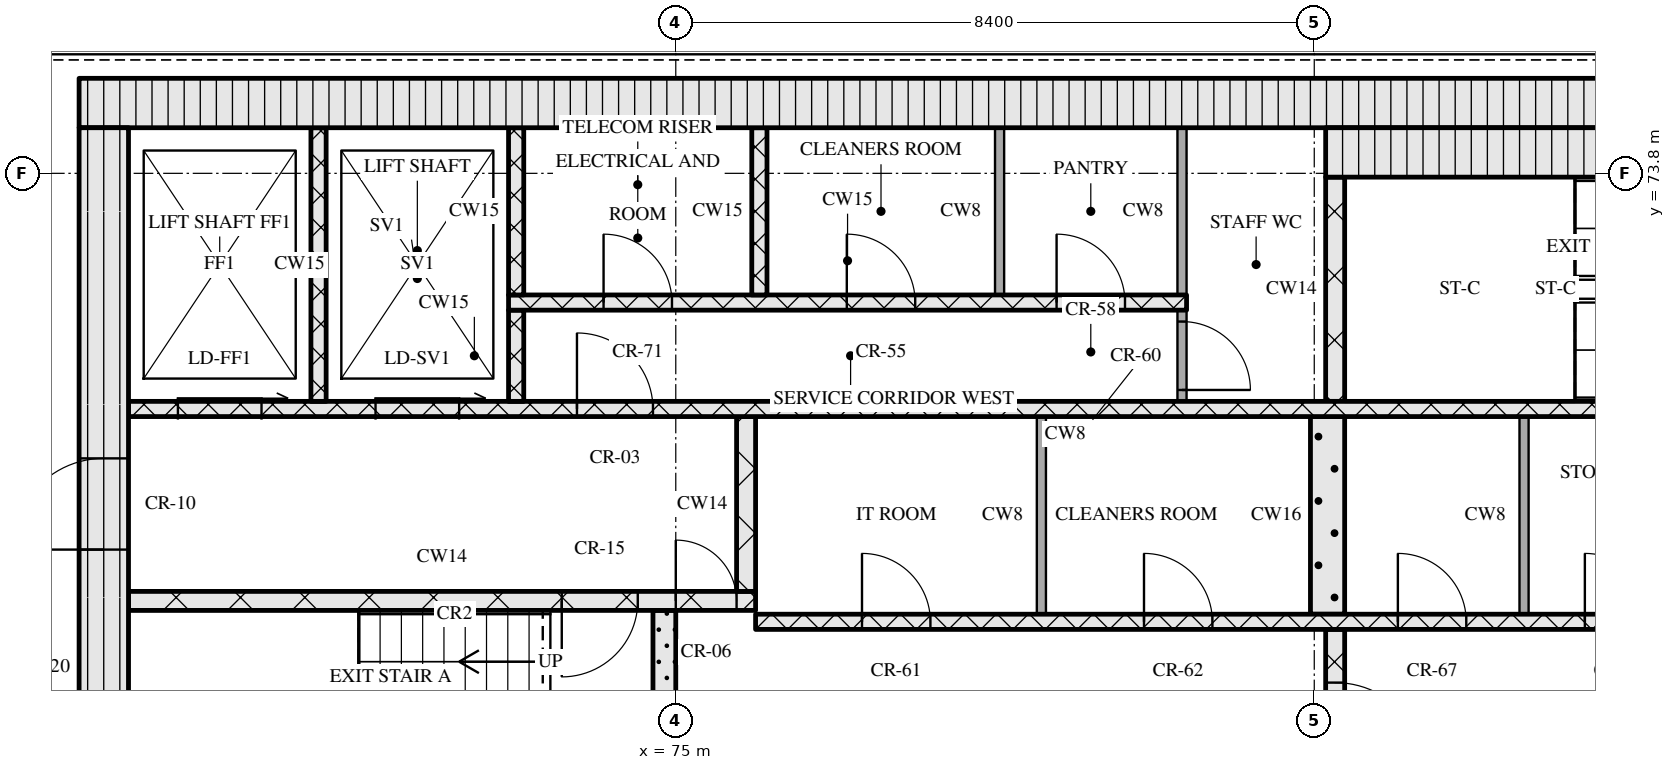
"""IFC4 building model, lengths in metres.
Left out: names, types, materials, properties, quantities, classifications, styles, units other than length and angle.
Written with IfcOpenShell. Run it as: python <this file> out.ifc"""

import sys

from ifc_helpers import new_model, si_unit, direction, frame, frame_2d, origin, place, context, subcontext, project, spatial, rectangle, extrude, element, fill, save


model = new_model("IFC4")
c1 = context("Model", 3, precision=1e-05, world=origin(), true_north=direction((0.0, 1.0)))
c2 = subcontext(c1, "Body", "Model", "MODEL_VIEW")
j1 = project(units=[si_unit("LENGTHUNIT", "METRE"), si_unit("PLANEANGLEUNIT", "RADIAN")], contexts=[c1])
p1 = place(None, origin())
s1 = spatial("IfcSite", under=j1, at=p1, CompositionType="ELEMENT")
p2 = place(p1, origin())
s2 = spatial("IfcBuilding", under=s1, at=p2, CompositionType="ELEMENT")
p3 = place(p2, frame((0.0, 0.0, 205.5)))
s3 = spatial("IfcBuildingStorey", under=s2, at=p3, CompositionType="ELEMENT", Elevation=205.5)
p4 = place(p3, frame((67.15, 74.725, 0.0), z_axis=(0.0, 0.0, 1.0), x_axis=(1.0, 0.0, 0.0)))
e1 = element("IfcWall", 1, at=p4, inside=s3, PredefinedType="SOLIDWALL", context=c2, shape_type="SweptSolid", body=[
    extrude(rectangle(XDim=40.9, YDim=0.65, at=frame_2d((20.45, 0.0))), origin(), (0.0, 0.0, 1.0), 3.32),
])
p5 = place(p3, frame((67.475, 62.4, 0.0), z_axis=(0.0, 0.0, 1.0), x_axis=(0.0, 1.0, 0.0)))
e2 = element("IfcWall", 2, at=p5, inside=s3, PredefinedType="SOLIDWALL", context=c2, shape_type="SweptSolid", body=[
    extrude(rectangle(XDim=12.0, YDim=0.65, at=frame_2d((6.0, 0.0))), origin(), (0.0, 0.0, 1.0), 3.32),
])
p6 = place(p5, frame((6.45, 0.0, 0.0)))
e3 = element("IfcOpeningElement", 3, at=p6, cuts=e2, PredefinedType="OPENING", context=c2, shape_type="SweptSolid", body=[
    extrude(rectangle(XDim=1.2, YDim=2.1, at=frame_2d((0.6, 1.05))), frame((0.0, 0.335, 0.0), z_axis=(0.0, -1.0, 0.0), x_axis=(1.0, 0.0, 0.0)), (0.0, 0.0, 1.0), 0.67),
])
p7 = place(p3, frame((74.85, 65.2, 0.0), z_axis=(0.0, 0.0, 1.0), x_axis=(0.0, 1.0, 0.0)))
e4 = element("IfcWall", 4, at=p7, inside=s3, PredefinedType="SOLIDWALL", context=c2, shape_type="SweptSolid", body=[
    extrude(rectangle(XDim=2.85, YDim=0.3, at=frame_2d((1.425, 0.0))), origin(), (0.0, 0.0, 1.0), 3.32),
])
p8 = place(p3, frame((83.675, 65.2, 0.0), z_axis=(0.0, 0.0, 1.0), x_axis=(0.0, 1.0, 0.0)))
e5 = element("IfcWall", 5, at=p8, inside=s3, PredefinedType="SOLIDWALL", context=c2, shape_type="SweptSolid", body=[
    extrude(rectangle(XDim=2.6, YDim=0.25, at=frame_2d((1.3, 0.0))), origin(), (0.0, 0.0, 1.0), 3.32),
])
p9 = place(p8, frame((0.7, 0.0, 0.0)))
e6 = element("IfcOpeningElement", 6, at=p9, cuts=e5, PredefinedType="OPENING", context=c2, shape_type="SweptSolid", body=[
    extrude(rectangle(XDim=1.2, YDim=2.1, at=frame_2d((0.6, 1.05))), frame((0.0, 0.135, 0.0), z_axis=(0.0, -1.0, 0.0), x_axis=(1.0, 0.0, 0.0)), (0.0, 0.0, 1.0), 0.27),
])
p10 = place(p3, frame((76.05, 67.9, 0.0), z_axis=(0.0, 0.0, 1.0), x_axis=(1.0, 0.0, 0.0)))
e7 = element("IfcWall", 7, at=p10, inside=s3, PredefinedType="SOLIDWALL", context=c2, shape_type="SweptSolid", body=[
    extrude(rectangle(XDim=23.1, YDim=0.2, at=frame_2d((11.55, 0.0))), origin(), (0.0, 0.0, 1.0), 3.32),
])
p11 = place(p10, frame((1.4, 0.0, 0.0)))
e8 = element("IfcOpeningElement", 8, at=p11, cuts=e7, PredefinedType="OPENING", context=c2, shape_type="SweptSolid", body=[
    extrude(rectangle(XDim=0.9, YDim=2.1, at=frame_2d((0.45, 1.05))), frame((0.0, 0.11, 0.0), z_axis=(0.0, -1.0, 0.0), x_axis=(1.0, 0.0, 0.0)), (0.0, 0.0, 1.0), 0.22),
])
p12 = place(p10, frame((5.11, 0.0, 0.0)))
e9 = element("IfcOpeningElement", 9, at=p12, cuts=e7, PredefinedType="OPENING", context=c2, shape_type="SweptSolid", body=[
    extrude(rectangle(XDim=0.9, YDim=2.1, at=frame_2d((0.45, 1.05))), frame((0.0, 0.11, 0.0), z_axis=(0.0, -1.0, 0.0), x_axis=(1.0, 0.0, 0.0)), (0.0, 0.0, 1.0), 0.22),
])
p13 = place(p10, frame((8.45, 0.0, 0.0)))
e10 = element("IfcOpeningElement", 10, at=p13, cuts=e7, PredefinedType="OPENING", context=c2, shape_type="SweptSolid", body=[
    extrude(rectangle(XDim=0.9, YDim=2.1, at=frame_2d((0.45, 1.05))), frame((0.0, 0.11, 0.0), z_axis=(0.0, -1.0, 0.0), x_axis=(1.0, 0.0, 0.0)), (0.0, 0.0, 1.0), 0.22),
])
p14 = place(p10, frame((10.91, 0.0, 0.0)))
e11 = element("IfcOpeningElement", 11, at=p14, cuts=e7, PredefinedType="OPENING", context=c2, shape_type="SweptSolid", body=[
    extrude(rectangle(XDim=0.9, YDim=2.1, at=frame_2d((0.45, 1.05))), frame((0.0, 0.11, 0.0), z_axis=(0.0, -1.0, 0.0), x_axis=(1.0, 0.0, 0.0)), (0.0, 0.0, 1.0), 0.22),
])
p15 = place(p10, frame((13.55, 0.0, 0.0)))
e12 = element("IfcOpeningElement", 12, at=p15, cuts=e7, PredefinedType="OPENING", context=c2, shape_type="SweptSolid", body=[
    extrude(rectangle(XDim=1.0, YDim=2.1, at=frame_2d((0.5, 1.05))), frame((0.0, 0.11, 0.0), z_axis=(0.0, -1.0, 0.0), x_axis=(1.0, 0.0, 0.0)), (0.0, 0.0, 1.0), 0.22),
])
p16 = place(p10, frame((16.2, 0.0, 0.0)))
e13 = element("IfcOpeningElement", 13, at=p16, cuts=e7, PredefinedType="OPENING", context=c2, shape_type="SweptSolid", body=[
    extrude(rectangle(XDim=1.1, YDim=2.1, at=frame_2d((0.55, 1.05))), frame((0.0, 0.11, 0.0), z_axis=(0.0, -1.0, 0.0), x_axis=(1.0, 0.0, 0.0)), (0.0, 0.0, 1.0), 0.22),
])
p17 = place(p10, frame((18.7, 0.0, 0.0)))
e14 = element("IfcOpeningElement", 14, at=p17, cuts=e7, PredefinedType="OPENING", context=c2, shape_type="SweptSolid", body=[
    extrude(rectangle(XDim=1.1, YDim=2.1, at=frame_2d((0.55, 1.05))), frame((0.0, 0.11, 0.0), z_axis=(0.0, -1.0, 0.0), x_axis=(1.0, 0.0, 0.0)), (0.0, 0.0, 1.0), 0.22),
])
p18 = place(p10, frame((21.2, 0.0, 0.0)))
e15 = element("IfcOpeningElement", 15, at=p18, cuts=e7, PredefinedType="OPENING", context=c2, shape_type="SweptSolid", body=[
    extrude(rectangle(XDim=1.1, YDim=2.1, at=frame_2d((0.55, 1.05))), frame((0.0, 0.11, 0.0), z_axis=(0.0, -1.0, 0.0), x_axis=(1.0, 0.0, 0.0)), (0.0, 0.0, 1.0), 0.22),
])
p19 = place(p3, frame((79.81, 68.0, 0.0), z_axis=(0.0, 0.0, 1.0), x_axis=(0.0, 1.0, 0.0)))
e16 = element("IfcWall", 16, at=p19, inside=s3, PredefinedType="PARTITIONING", context=c2, shape_type="SweptSolid", body=[
    extrude(rectangle(XDim=2.6, YDim=0.12, at=frame_2d((1.3, 0.0))), origin(), (0.0, 0.0, 1.0), 3.32),
])
p20 = place(p3, frame((83.575, 68.0, 0.0), z_axis=(0.0, 0.0, 1.0), x_axis=(0.0, 1.0, 0.0)))
e17 = element("IfcWall", 17, at=p20, inside=s3, PredefinedType="SOLIDWALL", context=c2, shape_type="SweptSolid", body=[
    extrude(rectangle(XDim=2.6, YDim=0.45, at=frame_2d((1.3, 0.0))), origin(), (0.0, 0.0, 1.0), 3.32),
])
p21 = place(p3, frame((86.16, 68.0, 0.0), z_axis=(0.0, 0.0, 1.0), x_axis=(0.0, 1.0, 0.0)))
e18 = element("IfcWall", 18, at=p21, inside=s3, PredefinedType="PARTITIONING", context=c2, shape_type="SweptSolid", body=[
    extrude(rectangle(XDim=2.6, YDim=0.12, at=frame_2d((1.3, 0.0))), origin(), (0.0, 0.0, 1.0), 3.32),
])
p22 = place(p3, frame((67.8, 68.175, 0.0), z_axis=(0.0, 0.0, 1.0), x_axis=(1.0, 0.0, 0.0)))
e19 = element("IfcWall", 19, at=p22, inside=s3, PredefinedType="SOLIDWALL", context=c2, shape_type="SweptSolid", body=[
    extrude(rectangle(XDim=8.25, YDim=0.25, at=frame_2d((4.125, 0.0))), origin(), (0.0, 0.0, 1.0), 3.32),
])
p23 = place(p22, frame((5.7, 0.0, 0.0)))
e20 = element("IfcOpeningElement", 20, at=p23, cuts=e19, PredefinedType="OPENING", context=c2, shape_type="SweptSolid", body=[
    extrude(rectangle(XDim=1.0, YDim=2.1, at=frame_2d((0.5, 1.05))), frame((0.0, 0.135, 0.0), z_axis=(0.0, -1.0, 0.0), x_axis=(1.0, 0.0, 0.0)), (0.0, 0.0, 1.0), 0.27),
])
p24 = place(p22, frame((7.2, 0.0, 0.0)))
e21 = element("IfcOpeningElement", 21, at=p24, cuts=e19, PredefinedType="OPENING", context=c2, shape_type="SweptSolid", body=[
    extrude(rectangle(XDim=0.8, YDim=2.1, at=frame_2d((0.4, 1.05))), frame((0.0, 0.135, 0.0), z_axis=(0.0, -1.0, 0.0), x_axis=(1.0, 0.0, 0.0)), (0.0, 0.0, 1.0), 0.27),
])
p25 = place(p3, frame((75.925, 68.3, 0.0), z_axis=(0.0, 0.0, 1.0), x_axis=(0.0, 1.0, 0.0)))
e22 = element("IfcWall", 22, at=p25, inside=s3, PredefinedType="SOLIDWALL", context=c2, shape_type="SweptSolid", body=[
    extrude(rectangle(XDim=2.3, YDim=0.25, at=frame_2d((1.15, 0.0))), origin(), (0.0, 0.0, 1.0), 3.32),
])
p26 = place(p3, frame((67.8, 70.7, 0.0), z_axis=(0.0, 0.0, 1.0), x_axis=(1.0, 0.0, 0.0)))
e23 = element("IfcWall", 23, at=p26, inside=s3, PredefinedType="SOLIDWALL", context=c2, shape_type="SweptSolid", body=[
    extrude(rectangle(XDim=39.6, YDim=0.2, at=frame_2d((19.8, 0.0))), origin(), (0.0, 0.0, 1.0), 3.32),
])
p27 = place(p26, frame((0.65, 0.0, 0.0)))
e24 = element("IfcOpeningElement", 24, at=p27, cuts=e23, PredefinedType="OPENING", context=c2, shape_type="SweptSolid", body=[
    extrude(rectangle(XDim=1.1, YDim=2.1, at=frame_2d((0.55, 1.05))), frame((0.0, 0.11, 0.0), z_axis=(0.0, -1.0, 0.0), x_axis=(1.0, 0.0, 0.0)), (0.0, 0.0, 1.0), 0.22),
])
p28 = place(p26, frame((3.25, 0.0, 0.0)))
e25 = element("IfcOpeningElement", 25, at=p28, cuts=e23, PredefinedType="OPENING", context=c2, shape_type="SweptSolid", body=[
    extrude(rectangle(XDim=1.1, YDim=2.1, at=frame_2d((0.55, 1.05))), frame((0.0, 0.11, 0.0), z_axis=(0.0, -1.0, 0.0), x_axis=(1.0, 0.0, 0.0)), (0.0, 0.0, 1.0), 0.22),
])
p29 = place(p26, frame((5.9, 0.0, 0.0)))
e26 = element("IfcOpeningElement", 26, at=p29, cuts=e23, PredefinedType="OPENING", context=c2, shape_type="SweptSolid", body=[
    extrude(rectangle(XDim=1.0, YDim=2.1, at=frame_2d((0.5, 1.05))), frame((0.0, 0.11, 0.0), z_axis=(0.0, -1.0, 0.0), x_axis=(1.0, 0.0, 0.0)), (0.0, 0.0, 1.0), 0.22),
])
p30 = place(p26, frame((21.7, 0.0, 0.0)))
e27 = element("IfcOpeningElement", 27, at=p30, cuts=e23, PredefinedType="OPENING", context=c2, shape_type="SweptSolid", body=[
    extrude(rectangle(XDim=1.0, YDim=2.1, at=frame_2d((0.5, 1.05))), frame((0.0, 0.11, 0.0), z_axis=(0.0, -1.0, 0.0), x_axis=(1.0, 0.0, 0.0)), (0.0, 0.0, 1.0), 0.22),
])
p31 = place(p26, frame((32.7, 0.0, 0.0)))
e28 = element("IfcOpeningElement", 28, at=p31, cuts=e23, PredefinedType="OPENING", context=c2, shape_type="SweptSolid", body=[
    extrude(rectangle(XDim=1.0, YDim=2.1, at=frame_2d((0.5, 1.05))), frame((0.0, 0.11, 0.0), z_axis=(0.0, -1.0, 0.0), x_axis=(1.0, 0.0, 0.0)), (0.0, 0.0, 1.0), 0.22),
])
p32 = place(p26, frame((35.25, 0.0, 0.0)))
e29 = element("IfcOpeningElement", 29, at=p32, cuts=e23, PredefinedType="OPENING", context=c2, shape_type="SweptSolid", body=[
    extrude(rectangle(XDim=1.1, YDim=2.1, at=frame_2d((0.55, 1.05))), frame((0.0, 0.11, 0.0), z_axis=(0.0, -1.0, 0.0), x_axis=(1.0, 0.0, 0.0)), (0.0, 0.0, 1.0), 0.22),
])
p33 = place(p26, frame((37.85, 0.0, 0.0)))
e30 = element("IfcOpeningElement", 30, at=p33, cuts=e23, PredefinedType="OPENING", context=c2, shape_type="SweptSolid", body=[
    extrude(rectangle(XDim=1.1, YDim=2.1, at=frame_2d((0.55, 1.05))), frame((0.0, 0.11, 0.0), z_axis=(0.0, -1.0, 0.0), x_axis=(1.0, 0.0, 0.0)), (0.0, 0.0, 1.0), 0.22),
])
p34 = place(p3, frame((70.3, 70.8, 0.0), z_axis=(0.0, 0.0, 1.0), x_axis=(0.0, 1.0, 0.0)))
e31 = element("IfcWall", 31, at=p34, inside=s3, PredefinedType="SOLIDWALL", context=c2, shape_type="SweptSolid", body=[
    extrude(rectangle(XDim=3.6, YDim=0.2, at=frame_2d((1.8, 0.0))), origin(), (0.0, 0.0, 1.0), 3.32),
])
p35 = place(p3, frame((72.9, 70.8, 0.0), z_axis=(0.0, 0.0, 1.0), x_axis=(0.0, 1.0, 0.0)))
e32 = element("IfcWall", 32, at=p35, inside=s3, PredefinedType="SOLIDWALL", context=c2, shape_type="SweptSolid", body=[
    extrude(rectangle(XDim=1.2, YDim=0.2, at=frame_2d((0.6, 0.0))), origin(), (0.0, 0.0, 1.0), 3.32),
])
p36 = place(p3, frame((81.66, 70.8, 0.0), z_axis=(0.0, 0.0, 1.0), x_axis=(0.0, 1.0, 0.0)))
e33 = element("IfcWall", 33, at=p36, inside=s3, PredefinedType="PARTITIONING", context=c2, shape_type="SweptSolid", body=[
    extrude(rectangle(XDim=1.2, YDim=0.12, at=frame_2d((0.6, 0.0))), origin(), (0.0, 0.0, 1.0), 3.32),
])
p37 = place(p36, frame((0.15, 0.0, 0.0)))
e34 = element("IfcOpeningElement", 34, at=p37, cuts=e33, PredefinedType="OPENING", context=c2, shape_type="SweptSolid", body=[
    extrude(rectangle(XDim=0.9, YDim=2.1, at=frame_2d((0.45, 1.05))), frame((0.0, 0.07, 0.0), z_axis=(0.0, -1.0, 0.0), x_axis=(1.0, 0.0, 0.0)), (0.0, 0.0, 1.0), 0.14),
])
p38 = place(p3, frame((83.675, 70.8, 0.0), z_axis=(0.0, 0.0, 1.0), x_axis=(0.0, 1.0, 0.0)))
e35 = element("IfcWall", 35, at=p38, inside=s3, PredefinedType="SOLIDWALL", context=c2, shape_type="SweptSolid", body=[
    extrude(rectangle(XDim=2.95, YDim=0.25, at=frame_2d((1.475, 0.0))), origin(), (0.0, 0.0, 1.0), 3.32),
])
p39 = place(p3, frame((72.8, 72.1, 0.0), z_axis=(0.0, 0.0, 1.0), x_axis=(1.0, 0.0, 0.0)))
e36 = element("IfcWall", 36, at=p39, inside=s3, PredefinedType="SOLIDWALL", context=c2, shape_type="SweptSolid", body=[
    extrude(rectangle(XDim=8.92, YDim=0.2, at=frame_2d((4.46, 0.0))), origin(), (0.0, 0.0, 1.0), 3.32),
])
p40 = place(p39, frame((1.25, 0.0, 0.0)))
e37 = element("IfcOpeningElement", 37, at=p40, cuts=e36, PredefinedType="OPENING", context=c2, shape_type="SweptSolid", body=[
    extrude(rectangle(XDim=0.9, YDim=2.1, at=frame_2d((0.45, 1.05))), frame((0.0, 0.11, 0.0), z_axis=(0.0, -1.0, 0.0), x_axis=(1.0, 0.0, 0.0)), (0.0, 0.0, 1.0), 0.22),
])
p41 = place(p39, frame((4.45, 0.0, 0.0)))
e38 = element("IfcOpeningElement", 38, at=p41, cuts=e36, PredefinedType="OPENING", context=c2, shape_type="SweptSolid", body=[
    extrude(rectangle(XDim=0.9, YDim=2.1, at=frame_2d((0.45, 1.05))), frame((0.0, 0.11, 0.0), z_axis=(0.0, -1.0, 0.0), x_axis=(1.0, 0.0, 0.0)), (0.0, 0.0, 1.0), 0.22),
])
p42 = place(p39, frame((7.21, 0.0, 0.0)))
e39 = element("IfcOpeningElement", 39, at=p42, cuts=e36, PredefinedType="OPENING", context=c2, shape_type="SweptSolid", body=[
    extrude(rectangle(XDim=0.9, YDim=2.1, at=frame_2d((0.45, 1.05))), frame((0.0, 0.11, 0.0), z_axis=(0.0, -1.0, 0.0), x_axis=(1.0, 0.0, 0.0)), (0.0, 0.0, 1.0), 0.22),
])
for number, where, z_axis, x_axis in (
    (40, (72.9, 72.2, 0.0), (0.0, 0.0, 1.0), (0.0, 1.0, 0.0)),
    (41, (76.1, 72.2, 0.0), (0.0, 0.0, 1.0), (0.0, 1.0, 0.0)),
):
    element("IfcWall", number, at=place(p3, frame(where, z_axis=z_axis, x_axis=x_axis)), inside=s3, PredefinedType="SOLIDWALL", context=c2, shape_type="SweptSolid", body=[
        extrude(rectangle(XDim=2.2, YDim=0.2, at=frame_2d((1.1, 0.0))), origin(), (0.0, 0.0, 1.0), 3.32),
    ])
for number, where, z_axis, x_axis in (
    (42, (79.26, 72.2, 0.0), (0.0, 0.0, 1.0), (0.0, 1.0, 0.0)),
    (43, (81.66, 72.2, 0.0), (0.0, 0.0, 1.0), (0.0, 1.0, 0.0)),
):
    element("IfcWall", number, at=place(p3, frame(where, z_axis=z_axis, x_axis=x_axis)), inside=s3, PredefinedType="PARTITIONING", context=c2, shape_type="SweptSolid", body=[
        extrude(rectangle(XDim=2.2, YDim=0.12, at=frame_2d((1.1, 0.0))), origin(), (0.0, 0.0, 1.0), 3.32),
    ])
p43 = place(p3, frame((83.55, 74.075, 0.0), z_axis=(0.0, 0.0, 1.0), x_axis=(1.0, 0.0, 0.0)))
e44 = element("IfcWall", 44, at=p43, inside=s3, PredefinedType="SOLIDWALL", context=c2, shape_type="SweptSolid", body=[
    extrude(rectangle(XDim=8.1, YDim=0.65, at=frame_2d((4.05, 0.0))), origin(), (0.0, 0.0, 1.0), 3.32),
])
p44 = place(p9, origin())
e45 = element("IfcDoor", 45, at=p44, inside=s3, OperationType="SINGLE_SWING_RIGHT", PredefinedType="DOOR", context=c2, shape_type="SweptSolid", body=[
    extrude(rectangle(XDim=1.2, YDim=2.1, at=frame_2d((0.6, 1.05))), frame((0.0, 0.025, 0.0), z_axis=(0.0, -1.0, 0.0), x_axis=(1.0, 0.0, 0.0)), (0.0, 0.0, 1.0), 0.05),
])
fill(e6, e45)
p45 = place(p11, origin())
e46 = element("IfcDoor", 46, at=p45, inside=s3, OperationType="SINGLE_SWING_LEFT", PredefinedType="DOOR", context=c2, shape_type="SweptSolid", body=[
    extrude(rectangle(XDim=0.9, YDim=2.1, at=frame_2d((0.45, 1.05))), frame((0.0, 0.025, 0.0), z_axis=(0.0, -1.0, 0.0), x_axis=(1.0, 0.0, 0.0)), (0.0, 0.0, 1.0), 0.05),
])
fill(e8, e46)
p46 = place(p12, origin())
e47 = element("IfcDoor", 47, at=p46, inside=s3, OperationType="SINGLE_SWING_LEFT", PredefinedType="DOOR", context=c2, shape_type="SweptSolid", body=[
    extrude(rectangle(XDim=0.9, YDim=2.1, at=frame_2d((0.45, 1.05))), frame((0.0, 0.025, 0.0), z_axis=(0.0, -1.0, 0.0), x_axis=(1.0, 0.0, 0.0)), (0.0, 0.0, 1.0), 0.05),
])
fill(e9, e47)
p47 = place(p13, origin())
e48 = element("IfcDoor", 48, at=p47, inside=s3, OperationType="SINGLE_SWING_LEFT", PredefinedType="DOOR", context=c2, shape_type="SweptSolid", body=[
    extrude(rectangle(XDim=0.9, YDim=2.1, at=frame_2d((0.45, 1.05))), frame((0.0, 0.025, 0.0), z_axis=(0.0, -1.0, 0.0), x_axis=(1.0, 0.0, 0.0)), (0.0, 0.0, 1.0), 0.05),
])
fill(e10, e48)
p48 = place(p14, origin())
e49 = element("IfcDoor", 49, at=p48, inside=s3, OperationType="SINGLE_SWING_LEFT", PredefinedType="DOOR", context=c2, shape_type="SweptSolid", body=[
    extrude(rectangle(XDim=0.9, YDim=2.1, at=frame_2d((0.45, 1.05))), frame((0.0, 0.025, 0.0), z_axis=(0.0, -1.0, 0.0), x_axis=(1.0, 0.0, 0.0)), (0.0, 0.0, 1.0), 0.05),
])
fill(e11, e49)
p49 = place(p23, origin())
e50 = element("IfcDoor", 50, at=p49, inside=s3, OperationType="SINGLE_SWING_RIGHT", PredefinedType="DOOR", context=c2, shape_type="SweptSolid", body=[
    extrude(rectangle(XDim=1.0, YDim=2.1, at=frame_2d((0.5, 1.05))), frame((0.0, 0.025, 0.0), z_axis=(0.0, -1.0, 0.0), x_axis=(1.0, 0.0, 0.0)), (0.0, 0.0, 1.0), 0.05),
])
fill(e20, e50)
p50 = place(p24, origin())
e51 = element("IfcDoor", 51, at=p50, inside=s3, OperationType="SINGLE_SWING_LEFT", PredefinedType="DOOR", context=c2, shape_type="SweptSolid", body=[
    extrude(rectangle(XDim=0.8, YDim=2.1, at=frame_2d((0.4, 1.05))), frame((0.0, 0.025, 0.0), z_axis=(0.0, -1.0, 0.0), x_axis=(1.0, 0.0, 0.0)), (0.0, 0.0, 1.0), 0.05),
])
fill(e21, e51)
p51 = place(p6, origin())
e52 = element("IfcDoor", 52, at=p51, inside=s3, OperationType="SINGLE_SWING_LEFT", PredefinedType="DOOR", context=c2, shape_type="SweptSolid", body=[
    extrude(rectangle(XDim=1.2, YDim=2.1, at=frame_2d((0.6, 1.05))), frame((0.0, 0.025, 0.0), z_axis=(0.0, -1.0, 0.0), x_axis=(1.0, 0.0, 0.0)), (0.0, 0.0, 1.0), 0.05),
])
fill(e3, e52)
p52 = place(p27, origin())
e53 = element("IfcDoor", 53, at=p52, inside=s3, OperationType="SLIDING_TO_RIGHT", PredefinedType="DOOR", context=c2, shape_type="SweptSolid", body=[
    extrude(rectangle(XDim=1.1, YDim=2.1, at=frame_2d((0.55, 1.05))), frame((0.0, 0.025, 0.0), z_axis=(0.0, -1.0, 0.0), x_axis=(1.0, 0.0, 0.0)), (0.0, 0.0, 1.0), 0.05),
])
fill(e24, e53)
p53 = place(p28, origin())
e54 = element("IfcDoor", 54, at=p53, inside=s3, OperationType="SLIDING_TO_RIGHT", PredefinedType="DOOR", context=c2, shape_type="SweptSolid", body=[
    extrude(rectangle(XDim=1.1, YDim=2.1, at=frame_2d((0.55, 1.05))), frame((0.0, 0.025, 0.0), z_axis=(0.0, -1.0, 0.0), x_axis=(1.0, 0.0, 0.0)), (0.0, 0.0, 1.0), 0.05),
])
fill(e25, e54)
p54 = place(p29, origin())
e55 = element("IfcDoor", 55, at=p54, inside=s3, OperationType="SINGLE_SWING_LEFT", PredefinedType="DOOR", context=c2, shape_type="SweptSolid", body=[
    extrude(rectangle(XDim=1.0, YDim=2.1, at=frame_2d((0.5, 1.05))), frame((0.0, 0.025, 0.0), z_axis=(0.0, -1.0, 0.0), x_axis=(1.0, 0.0, 0.0)), (0.0, 0.0, 1.0), 0.05),
])
fill(e26, e55)
p55 = place(p37, origin())
e56 = element("IfcDoor", 56, at=p55, inside=s3, OperationType="SINGLE_SWING_RIGHT", PredefinedType="DOOR", context=c2, shape_type="SweptSolid", body=[
    extrude(rectangle(XDim=0.9, YDim=2.1, at=frame_2d((0.45, 1.05))), frame((0.0, 0.025, 0.0), z_axis=(0.0, -1.0, 0.0), x_axis=(1.0, 0.0, 0.0)), (0.0, 0.0, 1.0), 0.05),
])
fill(e34, e56)
p56 = place(p40, origin())
e57 = element("IfcDoor", 57, at=p56, inside=s3, OperationType="SINGLE_SWING_LEFT", PredefinedType="DOOR", context=c2, shape_type="SweptSolid", body=[
    extrude(rectangle(XDim=0.9, YDim=2.1, at=frame_2d((0.45, 1.05))), frame((0.0, 0.025, 0.0), z_axis=(0.0, -1.0, 0.0), x_axis=(1.0, 0.0, 0.0)), (0.0, 0.0, 1.0), 0.05),
])
fill(e37, e57)
p57 = place(p41, origin())
e58 = element("IfcDoor", 58, at=p57, inside=s3, OperationType="SINGLE_SWING_LEFT", PredefinedType="DOOR", context=c2, shape_type="SweptSolid", body=[
    extrude(rectangle(XDim=0.9, YDim=2.1, at=frame_2d((0.45, 1.05))), frame((0.0, 0.025, 0.0), z_axis=(0.0, -1.0, 0.0), x_axis=(1.0, 0.0, 0.0)), (0.0, 0.0, 1.0), 0.05),
])
fill(e38, e58)
p58 = place(p42, origin())
e59 = element("IfcDoor", 59, at=p58, inside=s3, OperationType="SINGLE_SWING_LEFT", PredefinedType="DOOR", context=c2, shape_type="SweptSolid", body=[
    extrude(rectangle(XDim=0.9, YDim=2.1, at=frame_2d((0.45, 1.05))), frame((0.0, 0.025, 0.0), z_axis=(0.0, -1.0, 0.0), x_axis=(1.0, 0.0, 0.0)), (0.0, 0.0, 1.0), 0.05),
])
fill(e39, e59)
save(model, sys.argv[1])
